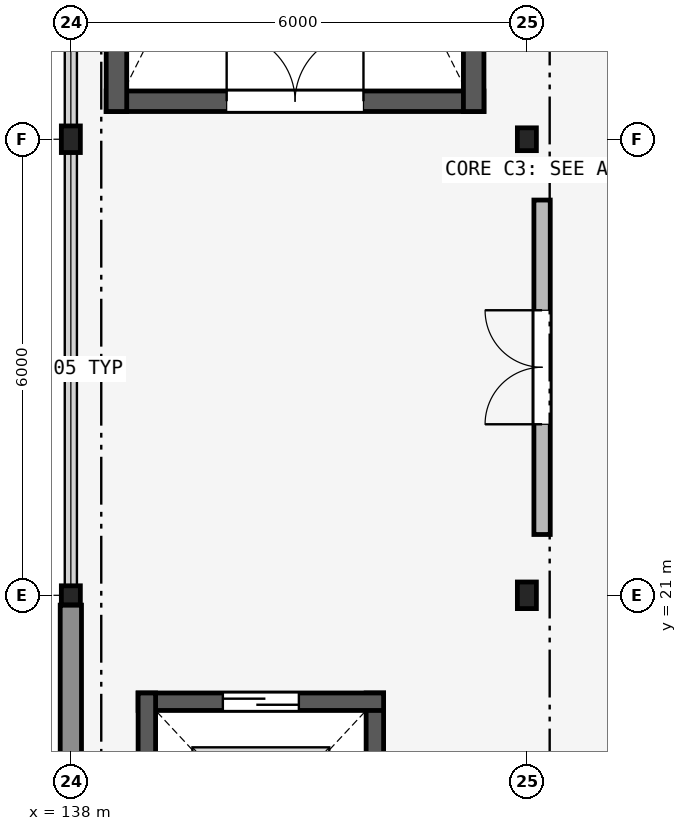
"""IFC4 building model, lengths in metres.
Left out: names, types, materials, properties, quantities, classifications, styles, units other than length and angle.
Written with IfcOpenShell. Run it as: python <this file> out.ifc"""

import sys

from ifc_helpers import new_model, si_unit, direction, frame, frame_2d, origin, origin_2d, place, context, subcontext, project, spatial, rectangle, hollow_rectangle, i_section, extrude, element, fill, save


model = new_model("IFC4")
c1 = context("Model", 3, precision=1e-05, world=origin(), true_north=direction((0.0, 1.0)))
c2 = subcontext(c1, "Body", "Model", "MODEL_VIEW")
j1 = project(units=[si_unit("LENGTHUNIT", "METRE"), si_unit("PLANEANGLEUNIT", "RADIAN")], contexts=[c1])
p1 = place(None, origin())
s1 = spatial("IfcSite", under=j1, at=p1, CompositionType="ELEMENT")
p2 = place(p1, origin())
s2 = spatial("IfcBuilding", under=s1, at=p2, CompositionType="ELEMENT")
p3 = place(p2, frame((0.0, 0.0, 22.2)))
s3 = spatial("IfcBuildingStorey", under=s2, at=p3, CompositionType="ELEMENT", Elevation=22.2)
p4 = place(p3, frame((138.0, 21.0, 0.0), z_axis=(0.0, 0.0, 1.0), x_axis=(1.0, 0.0, 0.0)))
e1 = element("IfcColumn", 1, at=p4, inside=s3, PredefinedType="COLUMN", context=c2, shape_type="SweptSolid", body=[
    extrude(hollow_rectangle(XDim=0.25, YDim=0.25, WallThickness=0.012, InnerFilletRadius=0.012, OuterFilletRadius=0.024, at=origin_2d()), origin(), (0.0, 0.0, 1.0), 3.9),
])
for number, where, z_axis, x_axis in (
    (2, (138.0, 27.0, 0.0), (0.0, 0.0, 1.0), (1.0, 0.0, 0.0)),
    (3, (144.0, 21.0, 0.0), (0.0, 0.0, 1.0), (1.0, 0.0, 0.0)),
):
    element("IfcColumn", number, at=place(p3, frame(where, z_axis=z_axis, x_axis=x_axis)), inside=s3, PredefinedType="COLUMN", context=c2, shape_type="SweptSolid", body=[
        extrude(i_section(OverallWidth=0.25, OverallDepth=0.35, WebThickness=0.01, FlangeThickness=0.012, FilletRadius=0.012, at=origin_2d()), origin(), (0.0, 0.0, 1.0), 3.9),
    ])
p5 = place(p3, frame((144.0, 27.0, 0.0), z_axis=(0.0, 0.0, 1.0), x_axis=(1.0, 0.0, 0.0)))
e4 = element("IfcColumn", 4, at=p5, inside=s3, PredefinedType="COLUMN", context=c2, shape_type="SweptSolid", body=[
    extrude(i_section(OverallWidth=0.25, OverallDepth=0.3, WebThickness=0.01, FlangeThickness=0.01, FilletRadius=0.012, at=origin_2d()), origin(), (0.0, 0.0, 1.0), 3.9),
])
p6 = place(p3, frame((138.0, 15.154, 0.0), z_axis=(0.0, 0.0, 1.0), x_axis=(0.0, 1.0, 0.0)))
e5 = element("IfcWall", 5, at=p6, inside=s3, PredefinedType="SOLIDWALL", context=c2, shape_type="SweptSolid", body=[
    extrude(rectangle(XDim=5.717, YDim=0.28, at=frame_2d((2.858, 0.0))), origin(), (0.0, 0.0, 1.0), 3.23),
])
p7 = place(p3, frame((138.465, 27.5, 0.0), z_axis=(0.0, 0.0, 1.0), x_axis=(1.0, 0.0, 0.0)))
e6 = element("IfcWall", 6, at=p7, inside=s3, PredefinedType="SHEAR", context=c2, shape_type="SweptSolid", body=[
    extrude(rectangle(XDim=4.97, YDim=0.27, at=frame_2d((2.485, 0.0))), origin(), (0.0, 0.0, 1.0), 3.76),
])
p8 = place(p7, frame((1.585, 0.0, 0.0)))
e7 = element("IfcOpeningElement", 7, at=p8, cuts=e6, PredefinedType="OPENING", context=c2, shape_type="SweptSolid", body=[
    extrude(rectangle(XDim=1.8, YDim=2.2, at=frame_2d((0.9, 1.1))), frame((0.0, 0.145, 0.0), z_axis=(0.0, -1.0, 0.0), x_axis=(1.0, 0.0, 0.0)), (0.0, 0.0, 1.0), 0.29),
])
for number, where, z_axis, x_axis in (
    (8, (143.3, 27.365, 0.0), (0.0, 0.0, 1.0), (0.0, 1.0, 0.0)),
    (9, (138.6, 36.935, 0.0), (0.0, 0.0, 1.0), (0.0, -1.0, 0.0)),
):
    element("IfcWall", number, at=place(p3, frame(where, z_axis=z_axis, x_axis=x_axis)), inside=s3, PredefinedType="SHEAR", context=c2, shape_type="SweptSolid", body=[
        extrude(rectangle(XDim=9.57, YDim=0.27, at=frame_2d((4.785, 0.0))), origin(), (0.0, 0.0, 1.0), 3.76),
    ])
p9 = place(p3, frame((144.2, 21.8, 0.0), z_axis=(0.0, 0.0, 1.0), x_axis=(0.0, 1.0, 0.0)))
e10 = element("IfcWall", 10, at=p9, inside=s3, PredefinedType="PARTITIONING", context=c2, shape_type="SweptSolid", body=[
    extrude(rectangle(XDim=4.4, YDim=0.215, at=frame_2d((2.2, 0.0))), origin(), (0.0, 0.0, 1.0), 3.356),
])
p10 = place(p9, frame((1.45, 0.0, 0.0)))
e11 = element("IfcOpeningElement", 11, at=p10, cuts=e10, PredefinedType="OPENING", context=c2, shape_type="SweptSolid", body=[
    extrude(rectangle(XDim=1.5, YDim=2.15, at=frame_2d((0.75, 1.075))), frame((0.0, 0.117, 0.0), z_axis=(0.0, -1.0, 0.0), x_axis=(1.0, 0.0, 0.0)), (0.0, 0.0, 1.0), 0.235),
])
p11 = place(p3, frame((142.0, 16.285, 0.0), z_axis=(0.0, 0.0, 1.0), x_axis=(0.0, 1.0, 0.0)))
e12 = element("IfcWall", 12, at=p11, inside=s3, PredefinedType="SHEAR", context=c2, shape_type="SweptSolid", body=[
    extrude(rectangle(XDim=3.43, YDim=0.23, at=frame_2d((1.715, 0.0))), origin(), (0.0, 0.0, 1.0), 3.9),
])
p12 = place(p3, frame((142.115, 19.6, 0.0), z_axis=(0.0, 0.0, 1.0), x_axis=(-1.0, 0.0, 0.0)))
e13 = element("IfcWall", 13, at=p12, inside=s3, PredefinedType="SHEAR", context=c2, shape_type="SweptSolid", body=[
    extrude(rectangle(XDim=3.23, YDim=0.23, at=frame_2d((1.615, 0.0))), origin(), (0.0, 0.0, 1.0), 3.9),
])
p13 = place(p12, frame((1.115, 0.0, 0.0)))
e14 = element("IfcOpeningElement", 14, at=p13, cuts=e13, PredefinedType="OPENING", context=c2, shape_type="SweptSolid", body=[
    extrude(rectangle(XDim=1.0, YDim=2.15, at=frame_2d((0.5, 1.075))), frame((0.0, 0.125, 0.0), z_axis=(0.0, -1.0, 0.0), x_axis=(1.0, 0.0, 0.0)), (0.0, 0.0, 1.0), 0.25),
])
p14 = place(p3, frame((139.0, 19.715, 0.0), z_axis=(0.0, 0.0, 1.0), x_axis=(0.0, -1.0, 0.0)))
e15 = element("IfcWall", 15, at=p14, inside=s3, PredefinedType="SHEAR", context=c2, shape_type="SweptSolid", body=[
    extrude(rectangle(XDim=3.43, YDim=0.23, at=frame_2d((1.715, 0.0))), origin(), (0.0, 0.0, 1.0), 3.9),
])
p15 = place(p8, origin())
e16 = element("IfcDoor", 16, at=p15, inside=s3, OperationType="DOUBLE_DOOR_SINGLE_SWING", PredefinedType="DOOR", context=c2, shape_type="SweptSolid", body=[
    extrude(rectangle(XDim=1.8, YDim=2.2, at=frame_2d((0.9, 1.1))), frame((0.0, 0.025, 0.0), z_axis=(0.0, -1.0, 0.0), x_axis=(1.0, 0.0, 0.0)), (0.0, 0.0, 1.0), 0.05),
])
fill(e7, e16)
p16 = place(p10, origin())
e17 = element("IfcDoor", 17, at=p16, inside=s3, OperationType="DOUBLE_DOOR_SINGLE_SWING", PredefinedType="DOOR", context=c2, shape_type="SweptSolid", body=[
    extrude(rectangle(XDim=1.5, YDim=2.15, at=frame_2d((0.75, 1.075))), frame((0.0, 0.025, 0.0), z_axis=(0.0, -1.0, 0.0), x_axis=(1.0, 0.0, 0.0)), (0.0, 0.0, 1.0), 0.05),
])
fill(e11, e17)
p17 = place(p13, origin())
e18 = element("IfcDoor", 18, at=p17, inside=s3, OperationType="SLIDING_TO_LEFT", PredefinedType="DOOR", context=c2, shape_type="SweptSolid", body=[
    extrude(rectangle(XDim=1.0, YDim=2.15, at=frame_2d((0.5, 1.075))), frame((0.0, 0.025, 0.0), z_axis=(0.0, -1.0, 0.0), x_axis=(1.0, 0.0, 0.0)), (0.0, 0.0, 1.0), 0.05),
])
fill(e14, e18)
save(model, sys.argv[1])
